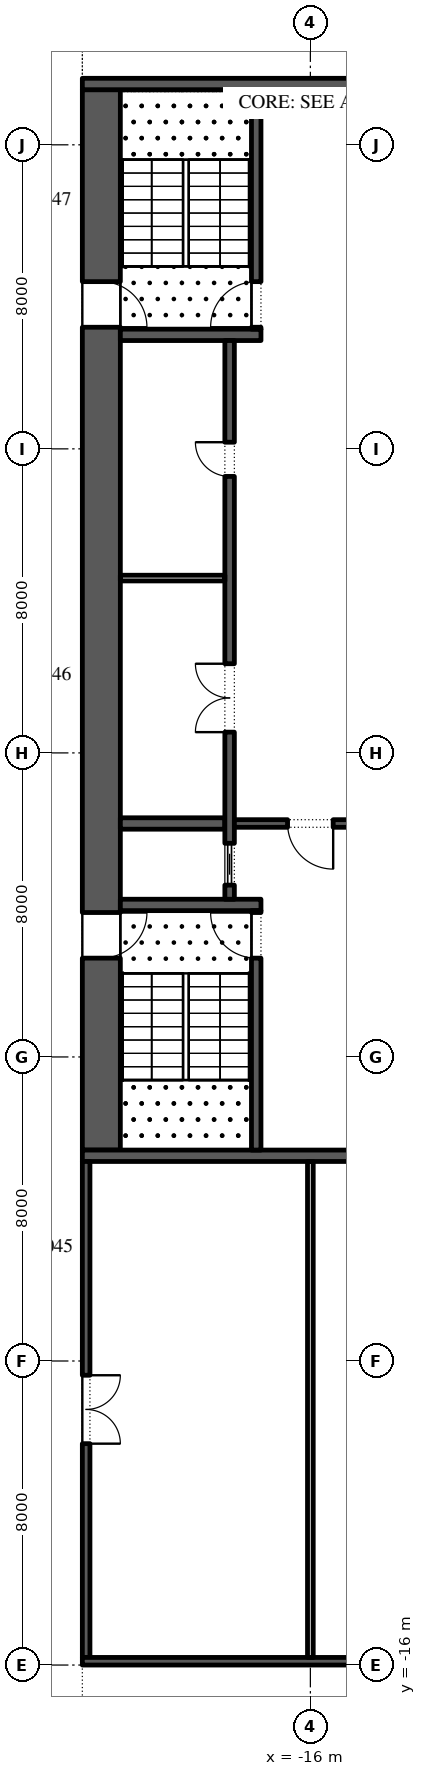
"""IFC4 building model, lengths in metres.
Left out: names, types, materials, properties, quantities, classifications, styles, units other than length and angle.
Written with IfcOpenShell. Run it as: python <this file> out.ifc"""

import sys

from ifc_helpers import new_model, si_unit, direction, frame, frame_2d, origin, place, context, subcontext, project, spatial, rectangle, extrude, element, fill, save


model = new_model("IFC4")
c1 = context("Model", 3, precision=1e-05, world=origin(), true_north=direction((0.0, 1.0)))
c2 = subcontext(c1, "Body", "Model", "MODEL_VIEW")
j1 = project(units=[si_unit("LENGTHUNIT", "METRE"), si_unit("PLANEANGLEUNIT", "RADIAN")], contexts=[c1])
p1 = place(None, origin())
s1 = spatial("IfcSite", under=j1, at=p1, CompositionType="ELEMENT")
p2 = place(p1, origin())
s2 = spatial("IfcBuilding", under=s1, at=p2, CompositionType="ELEMENT")
p3 = place(p2, frame((0.0, 0.0, -5.2)))
s3 = spatial("IfcBuildingStorey", under=s2, at=p3, CompositionType="ELEMENT", Elevation=-5.2)
p4 = place(p3, frame((-21.5, -2.45, 0.0), z_axis=(0.0, 0.0, 1.0), x_axis=(0.0, 1.0, 0.0)))
e1 = element("IfcWall", 1, at=p4, inside=s3, PredefinedType="SHEAR", context=c2, shape_type="SweptSolid", body=[
    extrude(rectangle(XDim=27.9, YDim=1.0, at=frame_2d((13.95, 0.0))), origin(), (0.0, 0.0, 1.0), 4.9),
])
p5 = place(p4, frame((5.05, 0.0, 0.0)))
e2 = element("IfcOpeningElement", 2, at=p5, cuts=e1, PredefinedType="OPENING", context=c2, shape_type="SweptSolid", body=[
    extrude(rectangle(XDim=1.2, YDim=2.1, at=frame_2d((0.6, 1.05))), frame((0.0, 0.51, 0.0), z_axis=(0.0, -1.0, 0.0), x_axis=(1.0, 0.0, 0.0)), (0.0, 0.0, 1.0), 1.02),
])
p6 = place(p4, frame((21.65, 0.0, 0.0)))
e3 = element("IfcOpeningElement", 3, at=p6, cuts=e1, PredefinedType="OPENING", context=c2, shape_type="SweptSolid", body=[
    extrude(rectangle(XDim=1.2, YDim=2.1, at=frame_2d((0.6, 1.05))), frame((0.0, 0.51, 0.0), z_axis=(0.0, -1.0, 0.0), x_axis=(1.0, 0.0, 0.0)), (0.0, 0.0, 1.0), 1.02),
])
for number, where, z_axis, x_axis in (
    (4, (-22.0, -2.6, 0.0), (0.0, 0.0, 1.0), (1.0, 0.0, 0.0)),
    (5, (-22.0, 25.6, 0.0), (0.0, 0.0, 1.0), (1.0, 0.0, 0.0)),
):
    element("IfcWall", number, at=place(p3, frame(where, z_axis=z_axis, x_axis=x_axis)), inside=s3, PredefinedType="SHEAR", context=c2, shape_type="SweptSolid", body=[
        extrude(rectangle(XDim=12.0, YDim=0.3, at=frame_2d((6.0, 0.0))), origin(), (0.0, 0.0, 1.0), 4.9),
    ])
p7 = place(p3, frame((-21.0, 4.0, 0.0), z_axis=(0.0, 0.0, 1.0), x_axis=(1.0, 0.0, 0.0)))
e6 = element("IfcWall", 6, at=p7, inside=s3, PredefinedType="SHEAR", context=c2, shape_type="SweptSolid", body=[
    extrude(rectangle(XDim=3.7, YDim=0.3, at=frame_2d((1.85, 0.0))), origin(), (0.0, 0.0, 1.0), 4.9),
])
p8 = place(p3, frame((-17.425, -2.45, 0.0), z_axis=(0.0, 0.0, 1.0), x_axis=(0.0, 1.0, 0.0)))
e7 = element("IfcWall", 7, at=p8, inside=s3, PredefinedType="SHEAR", context=c2, shape_type="SweptSolid", body=[
    extrude(rectangle(XDim=6.3, YDim=0.25, at=frame_2d((3.15, 0.0))), origin(), (0.0, 0.0, 1.0), 4.9),
])
p9 = place(p8, frame((5.05, 0.0, 0.0)))
e8 = element("IfcOpeningElement", 8, at=p9, cuts=e7, PredefinedType="OPENING", context=c2, shape_type="SweptSolid", body=[
    extrude(rectangle(XDim=1.2, YDim=2.1, at=frame_2d((0.6, 1.05))), frame((0.0, 0.135, 0.0), z_axis=(0.0, -1.0, 0.0), x_axis=(1.0, 0.0, 0.0)), (0.0, 0.0, 1.0), 0.27),
])
p10 = place(p3, frame((-21.0, 19.0, 0.0), z_axis=(0.0, 0.0, 1.0), x_axis=(1.0, 0.0, 0.0)))
e9 = element("IfcWall", 9, at=p10, inside=s3, PredefinedType="SHEAR", context=c2, shape_type="SweptSolid", body=[
    extrude(rectangle(XDim=3.7, YDim=0.3, at=frame_2d((1.85, 0.0))), origin(), (0.0, 0.0, 1.0), 4.9),
])
p11 = place(p3, frame((-17.425, 19.15, 0.0), z_axis=(0.0, 0.0, 1.0), x_axis=(0.0, 1.0, 0.0)))
e10 = element("IfcWall", 10, at=p11, inside=s3, PredefinedType="SHEAR", context=c2, shape_type="SweptSolid", body=[
    extrude(rectangle(XDim=6.3, YDim=0.25, at=frame_2d((3.15, 0.0))), origin(), (0.0, 0.0, 1.0), 4.9),
])
p12 = place(p11, frame((0.05, 0.0, 0.0)))
e11 = element("IfcOpeningElement", 11, at=p12, cuts=e10, PredefinedType="OPENING", context=c2, shape_type="SweptSolid", body=[
    extrude(rectangle(XDim=1.2, YDim=2.1, at=frame_2d((0.6, 1.05))), frame((0.0, 0.135, 0.0), z_axis=(0.0, -1.0, 0.0), x_axis=(1.0, 0.0, 0.0)), (0.0, 0.0, 1.0), 0.27),
])
p13 = place(p3, frame((-21.0, 6.143, 0.0), z_axis=(0.0, 0.0, 1.0), x_axis=(1.0, 0.0, 0.0)))
e12 = element("IfcWall", 12, at=p13, inside=s3, PredefinedType="SHEAR", context=c2, shape_type="SweptSolid", body=[
    extrude(rectangle(XDim=2.75, YDim=0.3, at=frame_2d((1.375, 0.0))), origin(), (0.0, 0.0, 1.0), 4.9),
])
p14 = place(p3, frame((-18.125, 4.15, 0.0), z_axis=(0.0, 0.0, 1.0), x_axis=(0.0, 1.0, 0.0)))
e13 = element("IfcWall", 13, at=p14, inside=s3, PredefinedType="SHEAR", context=c2, shape_type="SweptSolid", body=[
    extrude(rectangle(XDim=14.7, YDim=0.25, at=frame_2d((7.35, 0.0))), origin(), (0.0, 0.0, 1.0), 4.9),
])
p15 = place(p14, frame((4.396, 0.0, 0.0)))
e14 = element("IfcOpeningElement", 14, at=p15, cuts=e13, PredefinedType="OPENING", context=c2, shape_type="SweptSolid", body=[
    extrude(rectangle(XDim=1.8, YDim=2.4, at=frame_2d((0.9, 1.2))), frame((0.0, 0.135, 0.0), z_axis=(0.0, -1.0, 0.0), x_axis=(1.0, 0.0, 0.0)), (0.0, 0.0, 1.0), 0.27),
])
p16 = place(p14, frame((11.125, 0.0, 0.0)))
e15 = element("IfcOpeningElement", 15, at=p16, cuts=e13, PredefinedType="OPENING", context=c2, shape_type="SweptSolid", body=[
    extrude(rectangle(XDim=0.9, YDim=2.1, at=frame_2d((0.45, 1.05))), frame((0.0, 0.135, 0.0), z_axis=(0.0, -1.0, 0.0), x_axis=(1.0, 0.0, 0.0)), (0.0, 0.0, 1.0), 0.27),
])
p17 = place(p14, frame((0.371, 0.0, 0.0)))
e16 = element("IfcOpeningElement", 16, at=p17, cuts=e13, PredefinedType="OPENING", context=c2, shape_type="SweptSolid", body=[
    extrude(rectangle(XDim=1.1, YDim=2.1, at=frame_2d((0.55, 1.05))), frame((0.0, 0.135, 0.0), z_axis=(0.0, -1.0, 0.0), x_axis=(1.0, 0.0, 0.0)), (0.0, 0.0, 1.0), 0.27),
])
p18 = place(p3, frame((-21.0, 12.6, 0.0), z_axis=(0.0, 0.0, 1.0), x_axis=(1.0, 0.0, 0.0)))
e17 = element("IfcWall", 17, at=p18, inside=s3, PredefinedType="PARTITIONING", context=c2, shape_type="SweptSolid", body=[
    extrude(rectangle(XDim=2.75, YDim=0.15, at=frame_2d((1.375, 0.0))), origin(), (0.0, 0.0, 1.0), 4.9),
])
p19 = place(p3, frame((-18.0, 6.143, 0.0), z_axis=(0.0, 0.0, 1.0), x_axis=(1.0, 0.0, 0.0)))
e18 = element("IfcWall", 18, at=p19, inside=s3, PredefinedType="SHEAR", context=c2, shape_type="SweptSolid", body=[
    extrude(rectangle(XDim=4.0, YDim=0.2, at=frame_2d((2.0, 0.0))), origin(), (0.0, 0.0, 1.0), 4.9),
])
p20 = place(p19, frame((1.4, 0.0, 0.0)))
e19 = element("IfcOpeningElement", 19, at=p20, cuts=e18, PredefinedType="OPENING", context=c2, shape_type="SweptSolid", body=[
    extrude(rectangle(XDim=1.2, YDim=2.1, at=frame_2d((0.6, 1.05))), frame((0.0, 0.11, 0.0), z_axis=(0.0, -1.0, 0.0), x_axis=(1.0, 0.0, 0.0)), (0.0, 0.0, 1.0), 0.22),
])
p21 = place(p3, frame((-21.9, -15.8, 0.0), z_axis=(0.0, 0.0, 1.0), x_axis=(0.0, 1.0, 0.0)))
e20 = element("IfcWall", 20, at=p21, inside=s3, PredefinedType="SHEAR", context=c2, shape_type="SweptSolid", body=[
    extrude(rectangle(XDim=13.05, YDim=0.2, at=frame_2d((6.525, 0.0))), origin(), (0.0, 0.0, 1.0), 4.9),
])
p22 = place(p21, frame((5.625, 0.0, 0.0)))
e21 = element("IfcOpeningElement", 21, at=p22, cuts=e20, PredefinedType="OPENING", context=c2, shape_type="SweptSolid", body=[
    extrude(rectangle(XDim=1.8, YDim=2.4, at=frame_2d((0.9, 1.2))), frame((0.0, 0.11, 0.0), z_axis=(0.0, -1.0, 0.0), x_axis=(1.0, 0.0, 0.0)), (0.0, 0.0, 1.0), 0.22),
])
p23 = place(p3, frame((-22.0, -15.9, 0.0), z_axis=(0.0, 0.0, 1.0), x_axis=(1.0, 0.0, 0.0)))
e22 = element("IfcWall", 22, at=p23, inside=s3, PredefinedType="SHEAR", context=c2, shape_type="SweptSolid", body=[
    extrude(rectangle(XDim=12.0, YDim=0.2, at=frame_2d((6.0, 0.0))), origin(), (0.0, 0.0, 1.0), 4.9),
])
p24 = place(p3, frame((-16.0, -15.8, 0.0), z_axis=(0.0, 0.0, 1.0), x_axis=(0.0, 1.0, 0.0)))
e23 = element("IfcWall", 23, at=p24, inside=s3, PredefinedType="PARTITIONING", context=c2, shape_type="SweptSolid", body=[
    extrude(rectangle(XDim=13.05, YDim=0.15, at=frame_2d((6.525, 0.0))), origin(), (0.0, 0.0, 1.0), 4.9),
])
p25 = place(p15, origin())
e24 = element("IfcDoor", 24, at=p25, inside=s3, OperationType="DOUBLE_DOOR_SINGLE_SWING", PredefinedType="DOOR", context=c2, shape_type="SweptSolid", body=[
    extrude(rectangle(XDim=1.8, YDim=2.4, at=frame_2d((0.9, 1.2))), frame((0.0, 0.125, 0.0), z_axis=(0.0, -1.0, 0.0), x_axis=(1.0, 0.0, 0.0)), (0.0, 0.0, 1.0), 0.05),
])
fill(e14, e24)
p26 = place(p16, origin())
e25 = element("IfcDoor", 25, at=p26, inside=s3, OperationType="SINGLE_SWING_LEFT", PredefinedType="DOOR", context=c2, shape_type="SweptSolid", body=[
    extrude(rectangle(XDim=0.9, YDim=2.1, at=frame_2d((0.45, 1.05))), frame((0.0, 0.125, 0.0), z_axis=(0.0, -1.0, 0.0), x_axis=(1.0, 0.0, 0.0)), (0.0, 0.0, 1.0), 0.05),
])
fill(e15, e25)
p27 = place(p17, origin())
e26 = element("IfcDoor", 26, at=p27, inside=s3, OperationType="SLIDING_TO_LEFT", PredefinedType="DOOR", context=c2, shape_type="SweptSolid", body=[
    extrude(rectangle(XDim=1.1, YDim=2.1, at=frame_2d((0.55, 1.05))), frame((0.0, 0.025, 0.0), z_axis=(0.0, -1.0, 0.0), x_axis=(1.0, 0.0, 0.0)), (0.0, 0.0, 1.0), 0.05),
])
fill(e16, e26)
p28 = place(p20, frame((1.2, 0.0, 0.0), z_axis=(0.0, 0.0, 1.0), x_axis=(-1.0, 0.0, 0.0)))
e27 = element("IfcDoor", 27, at=p28, inside=s3, OperationType="SINGLE_SWING_RIGHT", PredefinedType="DOOR", context=c2, shape_type="SweptSolid", body=[
    extrude(rectangle(XDim=1.2, YDim=2.1, at=frame_2d((0.6, 1.05))), frame((0.0, 0.025, 0.0), z_axis=(0.0, -1.0, 0.0), x_axis=(1.0, 0.0, 0.0)), (0.0, 0.0, 1.0), 0.05),
])
fill(e19, e27)
p29 = place(p9, origin())
e28 = element("IfcDoor", 28, at=p29, inside=s3, OperationType="SINGLE_SWING_LEFT", PredefinedType="DOOR", context=c2, shape_type="SweptSolid", body=[
    extrude(rectangle(XDim=1.2, YDim=2.1, at=frame_2d((0.6, 1.05))), frame((0.0, 0.025, 0.0), z_axis=(0.0, -1.0, 0.0), x_axis=(1.0, 0.0, 0.0)), (0.0, 0.0, 1.0), 0.05),
])
fill(e8, e28)
p30 = place(p5, frame((1.2, 0.0, 0.0), z_axis=(0.0, 0.0, 1.0), x_axis=(-1.0, 0.0, 0.0)))
e29 = element("IfcDoor", 29, at=p30, inside=s3, OperationType="SINGLE_SWING_RIGHT", PredefinedType="DOOR", context=c2, shape_type="SweptSolid", body=[
    extrude(rectangle(XDim=1.2, YDim=2.1, at=frame_2d((0.6, 1.05))), frame((0.0, 0.025, 0.0), z_axis=(0.0, -1.0, 0.0), x_axis=(1.0, 0.0, 0.0)), (0.0, 0.0, 1.0), 0.05),
])
fill(e2, e29)
p31 = place(p12, origin())
e30 = element("IfcDoor", 30, at=p31, inside=s3, OperationType="SINGLE_SWING_RIGHT", PredefinedType="DOOR", context=c2, shape_type="SweptSolid", body=[
    extrude(rectangle(XDim=1.2, YDim=2.1, at=frame_2d((0.6, 1.05))), frame((0.0, 0.025, 0.0), z_axis=(0.0, -1.0, 0.0), x_axis=(1.0, 0.0, 0.0)), (0.0, 0.0, 1.0), 0.05),
])
fill(e11, e30)
p32 = place(p6, frame((1.2, 0.0, 0.0), z_axis=(0.0, 0.0, 1.0), x_axis=(-1.0, 0.0, 0.0)))
e31 = element("IfcDoor", 31, at=p32, inside=s3, OperationType="SINGLE_SWING_LEFT", PredefinedType="DOOR", context=c2, shape_type="SweptSolid", body=[
    extrude(rectangle(XDim=1.2, YDim=2.1, at=frame_2d((0.6, 1.05))), frame((0.0, 0.025, 0.0), z_axis=(0.0, -1.0, 0.0), x_axis=(1.0, 0.0, 0.0)), (0.0, 0.0, 1.0), 0.05),
])
fill(e3, e31)
p33 = place(p22, frame((1.8, -0.15, 0.0), z_axis=(0.0, 0.0, 1.0), x_axis=(-1.0, 0.0, 0.0)))
e32 = element("IfcDoor", 32, at=p33, inside=s3, OperationType="DOUBLE_DOOR_SINGLE_SWING", PredefinedType="DOOR", context=c2, shape_type="SweptSolid", body=[
    extrude(rectangle(XDim=1.8, YDim=2.4, at=frame_2d((0.9, 1.2))), frame((0.0, -0.05, 0.0), z_axis=(0.0, -1.0, 0.0), x_axis=(1.0, 0.0, 0.0)), (0.0, 0.0, 1.0), 0.05),
])
fill(e21, e32)
save(model, sys.argv[1])
